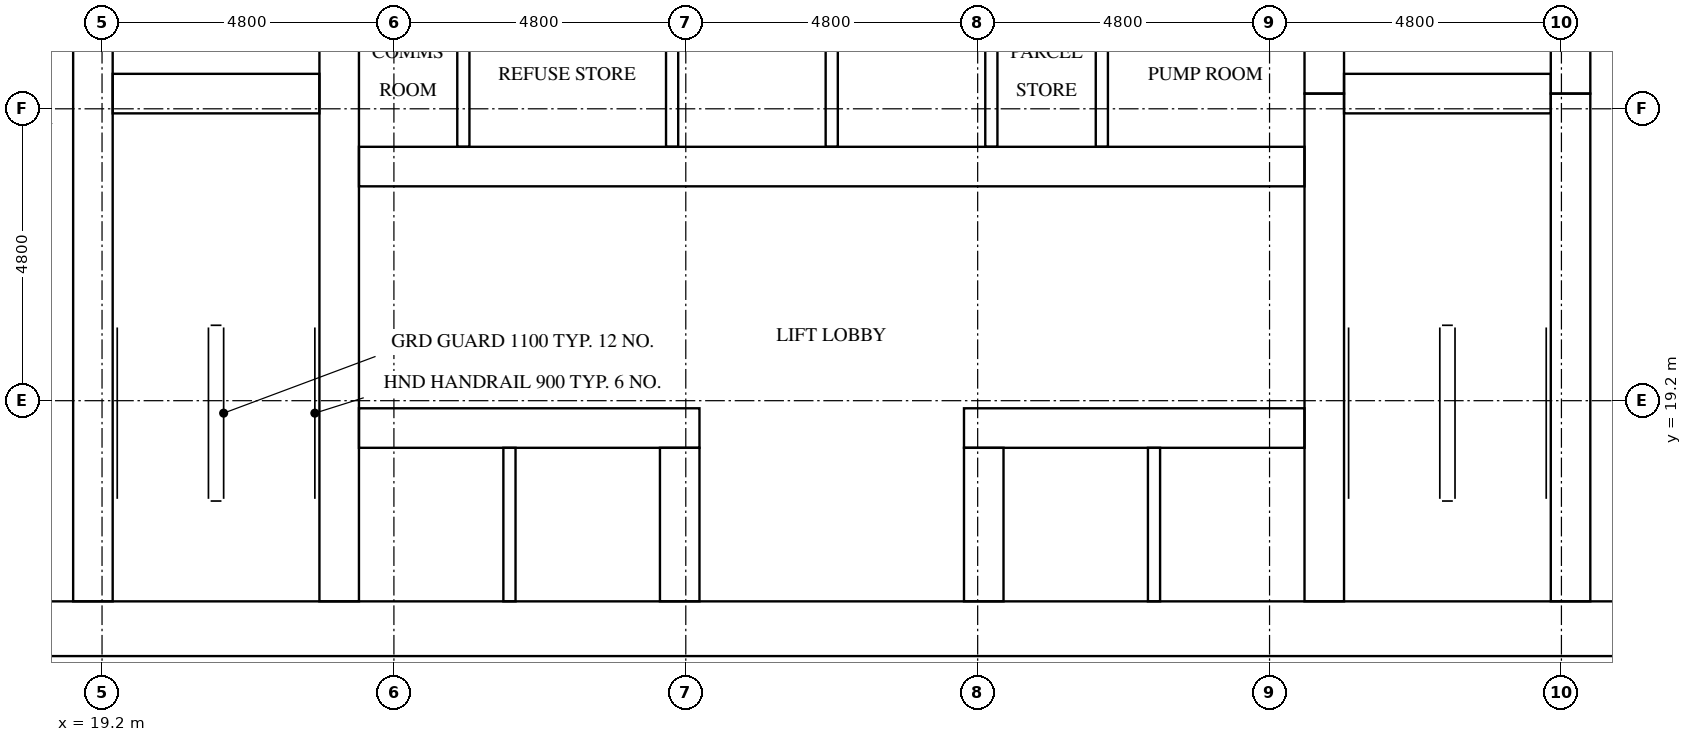
"""IFC4 building model, lengths in metres.
Left out: names, types, materials, properties, quantities, classifications, styles, units other than length and angle.
Written with IfcOpenShell. Run it as: python <this file> out.ifc"""

import sys

from ifc_helpers import new_model, si_unit, direction, frame, frame_2d, origin, place, context, subcontext, project, spatial, rectangle, extrude, element, fill, save


model = new_model("IFC4")
c1 = context("Model", 3, precision=1e-05, world=origin(), true_north=direction((0.0, 1.0)))
c2 = subcontext(c1, "Body", "Model", "MODEL_VIEW")
j1 = project(units=[si_unit("LENGTHUNIT", "METRE"), si_unit("PLANEANGLEUNIT", "RADIAN")], contexts=[c1])
p1 = place(None, origin())
s1 = spatial("IfcSite", under=j1, at=p1, CompositionType="ELEMENT")
p2 = place(p1, origin())
s2 = spatial("IfcBuilding", under=s1, at=p2, CompositionType="ELEMENT")
p3 = place(p2, frame((0.0, 0.0, 110.2)))
s3 = spatial("IfcBuildingStorey", under=s2, at=p3, CompositionType="ELEMENT", Elevation=110.2)
p4 = place(p3, frame((15.0, 15.45, 0.0), z_axis=(0.0, 0.0, 1.0), x_axis=(1.0, 0.0, 0.0)))
e1 = element("IfcWall", 1, at=p4, inside=s3, PredefinedType="SHEAR", context=c2, shape_type="SweptSolid", body=[
    extrude(rectangle(XDim=32.4, YDim=0.9, at=frame_2d((16.2, 0.0))), origin(), (0.0, 0.0, 1.0), 3.1),
])
p5 = place(p4, frame((15.3, 0.0, 0.0)))
e2 = element("IfcOpeningElement", 2, at=p5, cuts=e1, PredefinedType="OPENING", context=c2, shape_type="SweptSolid", body=[
    extrude(rectangle(XDim=1.8, YDim=2.1, at=frame_2d((0.9, 1.05))), frame((0.0, 0.46, 0.0), z_axis=(0.0, -1.0, 0.0), x_axis=(1.0, 0.0, 0.0)), (0.0, 0.0, 1.0), 0.92),
])
p6 = place(p3, frame((19.05, 15.9, 0.0), z_axis=(0.0, 0.0, 1.0), x_axis=(0.0, 1.0, 0.0)))
e3 = element("IfcWall", 3, at=p6, inside=s3, PredefinedType="SHEAR", context=c2, shape_type="SweptSolid", body=[
    extrude(rectangle(XDim=15.025, YDim=0.65, at=frame_2d((7.513, 0.0))), origin(), (0.0, 0.0, 1.0), 3.1),
])
p7 = place(p6, frame((9.55, 0.0, 0.0)))
e4 = element("IfcOpeningElement", 4, at=p7, cuts=e3, PredefinedType="OPENING", context=c2, shape_type="SweptSolid", body=[
    extrude(rectangle(XDim=1.1, YDim=2.1, at=frame_2d((0.55, 1.05))), frame((0.0, 0.335, 0.0), z_axis=(0.0, -1.0, 0.0), x_axis=(1.0, 0.0, 0.0)), (0.0, 0.0, 1.0), 0.67),
])
p8 = place(p6, frame((13.05, 0.0, 0.0)))
e5 = element("IfcOpeningElement", 5, at=p8, cuts=e3, PredefinedType="OPENING", context=c2, shape_type="SweptSolid", body=[
    extrude(rectangle(XDim=1.1, YDim=2.1, at=frame_2d((0.55, 1.05))), frame((0.0, 0.335, 0.0), z_axis=(0.0, -1.0, 0.0), x_axis=(1.0, 0.0, 0.0)), (0.0, 0.0, 1.0), 0.67),
])
p9 = place(p6, frame((0.3, 0.0, 0.0)))
e6 = element("IfcOpeningElement", 6, at=p9, cuts=e3, PredefinedType="OPENING", context=c2, shape_type="SweptSolid", body=[
    extrude(rectangle(XDim=1.2, YDim=2.1, at=frame_2d((0.6, 1.05))), frame((0.0, 0.335, 0.0), z_axis=(0.0, -1.0, 0.0), x_axis=(1.0, 0.0, 0.0)), (0.0, 0.0, 1.0), 0.67),
])
p10 = place(p3, frame((23.1, 15.9, 0.0), z_axis=(0.0, 0.0, 1.0), x_axis=(0.0, 1.0, 0.0)))
e7 = element("IfcWall", 7, at=p10, inside=s3, PredefinedType="SHEAR", context=c2, shape_type="SweptSolid", body=[
    extrude(rectangle(XDim=21.0, YDim=0.65, at=frame_2d((10.5, 0.0))), origin(), (0.0, 0.0, 1.0), 3.1),
])
p11 = place(p3, frame((39.3, 15.9, 0.0), z_axis=(0.0, 0.0, 1.0), x_axis=(0.0, 1.0, 0.0)))
e8 = element("IfcWall", 8, at=p11, inside=s3, PredefinedType="SHEAR", context=c2, shape_type="SweptSolid", body=[
    extrude(rectangle(XDim=8.35, YDim=0.65, at=frame_2d((4.175, 0.0))), origin(), (0.0, 0.0, 1.0), 3.1),
])
p12 = place(p3, frame((39.3, 24.25, 0.0), z_axis=(0.0, 0.0, 1.0), x_axis=(0.0, 1.0, 0.0)))
e9 = element("IfcWall", 9, at=p12, inside=s3, PredefinedType="SHEAR", context=c2, shape_type="SweptSolid", body=[
    extrude(rectangle(XDim=3.5, YDim=0.65, at=frame_2d((1.75, 0.0))), origin(), (0.0, 0.0, 1.0), 3.1),
])
p13 = place(p3, frame((43.35, 15.9, 0.0), z_axis=(0.0, 0.0, 1.0), x_axis=(0.0, 1.0, 0.0)))
e10 = element("IfcWall", 10, at=p13, inside=s3, PredefinedType="SHEAR", context=c2, shape_type="SweptSolid", body=[
    extrude(rectangle(XDim=8.35, YDim=0.65, at=frame_2d((4.175, 0.0))), origin(), (0.0, 0.0, 1.0), 3.1),
])
p14 = place(p13, frame((0.3, 0.0, 0.0)))
e11 = element("IfcOpeningElement", 11, at=p14, cuts=e10, PredefinedType="OPENING", context=c2, shape_type="SweptSolid", body=[
    extrude(rectangle(XDim=1.2, YDim=2.1, at=frame_2d((0.6, 1.05))), frame((0.0, 0.335, 0.0), z_axis=(0.0, -1.0, 0.0), x_axis=(1.0, 0.0, 0.0)), (0.0, 0.0, 1.0), 0.67),
])
p15 = place(p3, frame((43.35, 24.25, 0.0), z_axis=(0.0, 0.0, 1.0), x_axis=(0.0, 1.0, 0.0)))
e12 = element("IfcWall", 12, at=p15, inside=s3, PredefinedType="SHEAR", context=c2, shape_type="SweptSolid", body=[
    extrude(rectangle(XDim=3.5, YDim=0.65, at=frame_2d((1.75, 0.0))), origin(), (0.0, 0.0, 1.0), 3.1),
])
p16 = place(p15, frame((1.2, 0.0, 0.0)))
e13 = element("IfcOpeningElement", 13, at=p16, cuts=e12, PredefinedType="OPENING", context=c2, shape_type="SweptSolid", body=[
    extrude(rectangle(XDim=1.1, YDim=2.1, at=frame_2d((0.55, 1.05))), frame((0.0, 0.335, 0.0), z_axis=(0.0, -1.0, 0.0), x_axis=(1.0, 0.0, 0.0)), (0.0, 0.0, 1.0), 0.67),
])
for number, where, z_axis, x_axis in (
    (14, (19.375, 24.25, 0.0), (0.0, 0.0, 1.0), (1.0, 0.0, 0.0)),
    (15, (39.625, 24.25, 0.0), (0.0, 0.0, 1.0), (1.0, 0.0, 0.0)),
):
    element("IfcWall", number, at=place(p3, frame(where, z_axis=z_axis, x_axis=x_axis)), inside=s3, PredefinedType="SHEAR", context=c2, shape_type="SweptSolid", body=[
        extrude(rectangle(XDim=3.4, YDim=0.65, at=frame_2d((1.7, 0.0))), origin(), (0.0, 0.0, 1.0), 3.1),
    ])
p17 = place(p3, frame((23.425, 18.75, 0.0), z_axis=(0.0, 0.0, 1.0), x_axis=(1.0, 0.0, 0.0)))
e16 = element("IfcWall", 16, at=p17, inside=s3, PredefinedType="SHEAR", context=c2, shape_type="SweptSolid", body=[
    extrude(rectangle(XDim=5.6, YDim=0.65, at=frame_2d((2.8, 0.0))), origin(), (0.0, 0.0, 1.0), 3.1),
])
p18 = place(p17, frame((0.637, 0.0, 0.0)))
e17 = element("IfcOpeningElement", 17, at=p18, cuts=e16, PredefinedType="OPENING", context=c2, shape_type="SweptSolid", body=[
    extrude(rectangle(XDim=1.1, YDim=2.1, at=frame_2d((0.55, 1.05))), frame((0.0, 0.335, 0.0), z_axis=(0.0, -1.0, 0.0), x_axis=(1.0, 0.0, 0.0)), (0.0, 0.0, 1.0), 0.67),
])
p19 = place(p17, frame((3.212, 0.0, 0.0)))
e18 = element("IfcOpeningElement", 18, at=p19, cuts=e16, PredefinedType="OPENING", context=c2, shape_type="SweptSolid", body=[
    extrude(rectangle(XDim=1.1, YDim=2.1, at=frame_2d((0.55, 1.05))), frame((0.0, 0.335, 0.0), z_axis=(0.0, -1.0, 0.0), x_axis=(1.0, 0.0, 0.0)), (0.0, 0.0, 1.0), 0.67),
])
p20 = place(p3, frame((33.375, 18.75, 0.0), z_axis=(0.0, 0.0, 1.0), x_axis=(1.0, 0.0, 0.0)))
e19 = element("IfcWall", 19, at=p20, inside=s3, PredefinedType="SHEAR", context=c2, shape_type="SweptSolid", body=[
    extrude(rectangle(XDim=5.6, YDim=0.65, at=frame_2d((2.8, 0.0))), origin(), (0.0, 0.0, 1.0), 3.1),
])
p21 = place(p20, frame((1.288, 0.0, 0.0)))
e20 = element("IfcOpeningElement", 20, at=p21, cuts=e19, PredefinedType="OPENING", context=c2, shape_type="SweptSolid", body=[
    extrude(rectangle(XDim=1.1, YDim=2.1, at=frame_2d((0.55, 1.05))), frame((0.0, 0.335, 0.0), z_axis=(0.0, -1.0, 0.0), x_axis=(1.0, 0.0, 0.0)), (0.0, 0.0, 1.0), 0.67),
])
p22 = place(p20, frame((3.863, 0.0, 0.0)))
e21 = element("IfcOpeningElement", 21, at=p22, cuts=e19, PredefinedType="OPENING", context=c2, shape_type="SweptSolid", body=[
    extrude(rectangle(XDim=1.1, YDim=2.1, at=frame_2d((0.55, 1.05))), frame((0.0, 0.335, 0.0), z_axis=(0.0, -1.0, 0.0), x_axis=(1.0, 0.0, 0.0)), (0.0, 0.0, 1.0), 0.67),
])
p23 = place(p3, frame((23.425, 23.05, 0.0), z_axis=(0.0, 0.0, 1.0), x_axis=(1.0, 0.0, 0.0)))
e22 = element("IfcWall", 22, at=p23, inside=s3, PredefinedType="SHEAR", context=c2, shape_type="SweptSolid", body=[
    extrude(rectangle(XDim=15.55, YDim=0.65, at=frame_2d((7.775, 0.0))), origin(), (0.0, 0.0, 1.0), 3.1),
])
p24 = place(p23, frame((0.309, 0.0, 0.0)))
e23 = element("IfcOpeningElement", 23, at=p24, cuts=e22, PredefinedType="OPENING", context=c2, shape_type="SweptSolid", body=[
    extrude(rectangle(XDim=1.0, YDim=2.1, at=frame_2d((0.5, 1.05))), frame((0.0, 0.335, 0.0), z_axis=(0.0, -1.0, 0.0), x_axis=(1.0, 0.0, 0.0)), (0.0, 0.0, 1.0), 0.67),
])
p25 = place(p23, frame((2.934, 0.0, 0.0)))
e24 = element("IfcOpeningElement", 24, at=p25, cuts=e22, PredefinedType="OPENING", context=c2, shape_type="SweptSolid", body=[
    extrude(rectangle(XDim=1.0, YDim=2.1, at=frame_2d((0.5, 1.05))), frame((0.0, 0.335, 0.0), z_axis=(0.0, -1.0, 0.0), x_axis=(1.0, 0.0, 0.0)), (0.0, 0.0, 1.0), 0.67),
])
p26 = place(p23, frame((10.809, 0.0, 0.0)))
e25 = element("IfcOpeningElement", 25, at=p26, cuts=e22, PredefinedType="OPENING", context=c2, shape_type="SweptSolid", body=[
    extrude(rectangle(XDim=1.0, YDim=2.1, at=frame_2d((0.5, 1.05))), frame((0.0, 0.335, 0.0), z_axis=(0.0, -1.0, 0.0), x_axis=(1.0, 0.0, 0.0)), (0.0, 0.0, 1.0), 0.67),
])
p27 = place(p23, frame((13.434, 0.0, 0.0)))
e26 = element("IfcOpeningElement", 26, at=p27, cuts=e22, PredefinedType="OPENING", context=c2, shape_type="SweptSolid", body=[
    extrude(rectangle(XDim=1.0, YDim=2.1, at=frame_2d((0.5, 1.05))), frame((0.0, 0.335, 0.0), z_axis=(0.0, -1.0, 0.0), x_axis=(1.0, 0.0, 0.0)), (0.0, 0.0, 1.0), 0.67),
])
for number, where, z_axis, x_axis in (
    (27, (28.7, 15.9, 0.0), (0.0, 0.0, 1.0), (0.0, 1.0, 0.0)),
    (28, (33.7, 15.9, 0.0), (0.0, 0.0, 1.0), (0.0, 1.0, 0.0)),
):
    element("IfcWall", number, at=place(p3, frame(where, z_axis=z_axis, x_axis=x_axis)), inside=s3, PredefinedType="SHEAR", context=c2, shape_type="SweptSolid", body=[
        extrude(rectangle(XDim=2.525, YDim=0.65, at=frame_2d((1.263, 0.0))), origin(), (0.0, 0.0, 1.0), 3.1),
    ])
for number, where, z_axis, x_axis in (
    (29, (28.575, 23.375, 0.0), (0.0, 0.0, 1.0), (0.0, 1.0, 0.0)),
    (30, (31.2, 23.375, 0.0), (0.0, 0.0, 1.0), (0.0, 1.0, 0.0)),
    (31, (33.825, 23.375, 0.0), (0.0, 0.0, 1.0), (0.0, 1.0, 0.0)),
):
    element("IfcWall", number, at=place(p3, frame(where, z_axis=z_axis, x_axis=x_axis)), inside=s3, PredefinedType="SOLIDWALL", context=c2, shape_type="SweptSolid", body=[
        extrude(rectangle(XDim=2.45, YDim=0.2, at=frame_2d((1.225, 0.0))), origin(), (0.0, 0.0, 1.0), 3.1),
    ])
for number, where, z_axis, x_axis in (
    (32, (25.9, 15.9, 0.0), (0.0, 0.0, 1.0), (0.0, 1.0, 0.0)),
    (33, (36.5, 15.9, 0.0), (0.0, 0.0, 1.0), (0.0, 1.0, 0.0)),
):
    element("IfcWall", number, at=place(p3, frame(where, z_axis=z_axis, x_axis=x_axis)), inside=s3, PredefinedType="SOLIDWALL", context=c2, shape_type="SweptSolid", body=[
        extrude(rectangle(XDim=2.525, YDim=0.2, at=frame_2d((1.263, 0.0))), origin(), (0.0, 0.0, 1.0), 3.1),
    ])
for number, where, z_axis, x_axis in (
    (34, (25.142, 23.375, 0.0), (0.0, 0.0, 1.0), (0.0, 1.0, 0.0)),
    (35, (35.642, 23.375, 0.0), (0.0, 0.0, 1.0), (0.0, 1.0, 0.0)),
):
    element("IfcWall", number, at=place(p3, frame(where, z_axis=z_axis, x_axis=x_axis)), inside=s3, PredefinedType="PARTITIONING", context=c2, shape_type="SweptSolid", body=[
        extrude(rectangle(XDim=2.45, YDim=0.2, at=frame_2d((1.225, 0.0))), origin(), (0.0, 0.0, 1.0), 3.1),
    ])
p28 = place(p18, origin())
e36 = element("IfcDoor", 36, at=p28, inside=s3, OperationType="DOUBLE_DOOR_SLIDING", PredefinedType="DOOR", context=c2, shape_type="SweptSolid", body=[
    extrude(rectangle(XDim=1.1, YDim=2.1, at=frame_2d((0.55, 1.05))), frame((0.0, 0.025, 0.0), z_axis=(0.0, -1.0, 0.0), x_axis=(1.0, 0.0, 0.0)), (0.0, 0.0, 1.0), 0.05),
])
fill(e17, e36)
p29 = place(p19, origin())
e37 = element("IfcDoor", 37, at=p29, inside=s3, OperationType="DOUBLE_DOOR_SLIDING", PredefinedType="DOOR", context=c2, shape_type="SweptSolid", body=[
    extrude(rectangle(XDim=1.1, YDim=2.1, at=frame_2d((0.55, 1.05))), frame((0.0, 0.025, 0.0), z_axis=(0.0, -1.0, 0.0), x_axis=(1.0, 0.0, 0.0)), (0.0, 0.0, 1.0), 0.05),
])
fill(e18, e37)
p30 = place(p21, origin())
e38 = element("IfcDoor", 38, at=p30, inside=s3, OperationType="DOUBLE_DOOR_SLIDING", PredefinedType="DOOR", context=c2, shape_type="SweptSolid", body=[
    extrude(rectangle(XDim=1.1, YDim=2.1, at=frame_2d((0.55, 1.05))), frame((0.0, 0.025, 0.0), z_axis=(0.0, -1.0, 0.0), x_axis=(1.0, 0.0, 0.0)), (0.0, 0.0, 1.0), 0.05),
])
fill(e20, e38)
p31 = place(p22, origin())
e39 = element("IfcDoor", 39, at=p31, inside=s3, OperationType="DOUBLE_DOOR_SLIDING", PredefinedType="DOOR", context=c2, shape_type="SweptSolid", body=[
    extrude(rectangle(XDim=1.1, YDim=2.1, at=frame_2d((0.55, 1.05))), frame((0.0, 0.025, 0.0), z_axis=(0.0, -1.0, 0.0), x_axis=(1.0, 0.0, 0.0)), (0.0, 0.0, 1.0), 0.05),
])
fill(e21, e39)
p32 = place(p9, frame((1.2, 0.0, 0.0), z_axis=(0.0, 0.0, 1.0), x_axis=(-1.0, 0.0, 0.0)))
e40 = element("IfcDoor", 40, at=p32, inside=s3, OperationType="SINGLE_SWING_RIGHT", PredefinedType="DOOR", context=c2, shape_type="SweptSolid", body=[
    extrude(rectangle(XDim=1.2, YDim=2.1, at=frame_2d((0.6, 1.05))), frame((0.0, 0.025, 0.0), z_axis=(0.0, -1.0, 0.0), x_axis=(1.0, 0.0, 0.0)), (0.0, 0.0, 1.0), 0.05),
])
fill(e6, e40)
p33 = place(p14, origin())
e41 = element("IfcDoor", 41, at=p33, inside=s3, OperationType="SINGLE_SWING_LEFT", PredefinedType="DOOR", context=c2, shape_type="SweptSolid", body=[
    extrude(rectangle(XDim=1.2, YDim=2.1, at=frame_2d((0.6, 1.05))), frame((0.0, 0.025, 0.0), z_axis=(0.0, -1.0, 0.0), x_axis=(1.0, 0.0, 0.0)), (0.0, 0.0, 1.0), 0.05),
])
fill(e11, e41)
p34 = place(p5, frame((1.8, 0.0, 0.0), z_axis=(0.0, 0.0, 1.0), x_axis=(-1.0, 0.0, 0.0)))
e42 = element("IfcDoor", 42, at=p34, inside=s3, OperationType="DOUBLE_DOOR_SINGLE_SWING", PredefinedType="DOOR", context=c2, shape_type="SweptSolid", body=[
    extrude(rectangle(XDim=1.8, YDim=2.1, at=frame_2d((0.9, 1.05))), frame((0.0, 0.025, 0.0), z_axis=(0.0, -1.0, 0.0), x_axis=(1.0, 0.0, 0.0)), (0.0, 0.0, 1.0), 0.05),
])
fill(e2, e42)
p35 = place(p24, frame((1.0, 0.0, 0.0), z_axis=(0.0, 0.0, 1.0), x_axis=(-1.0, 0.0, 0.0)))
e43 = element("IfcDoor", 43, at=p35, inside=s3, OperationType="SINGLE_SWING_LEFT", PredefinedType="DOOR", context=c2, shape_type="SweptSolid", body=[
    extrude(rectangle(XDim=1.0, YDim=2.1, at=frame_2d((0.5, 1.05))), frame((0.0, 0.025, 0.0), z_axis=(0.0, -1.0, 0.0), x_axis=(1.0, 0.0, 0.0)), (0.0, 0.0, 1.0), 0.05),
])
fill(e23, e43)
p36 = place(p25, frame((1.0, 0.0, 0.0), z_axis=(0.0, 0.0, 1.0), x_axis=(-1.0, 0.0, 0.0)))
e44 = element("IfcDoor", 44, at=p36, inside=s3, OperationType="SINGLE_SWING_RIGHT", PredefinedType="DOOR", context=c2, shape_type="SweptSolid", body=[
    extrude(rectangle(XDim=1.0, YDim=2.1, at=frame_2d((0.5, 1.05))), frame((0.0, 0.025, 0.0), z_axis=(0.0, -1.0, 0.0), x_axis=(1.0, 0.0, 0.0)), (0.0, 0.0, 1.0), 0.05),
])
fill(e24, e44)
p37 = place(p26, frame((1.0, 0.0, 0.0), z_axis=(0.0, 0.0, 1.0), x_axis=(-1.0, 0.0, 0.0)))
e45 = element("IfcDoor", 45, at=p37, inside=s3, OperationType="SINGLE_SWING_LEFT", PredefinedType="DOOR", context=c2, shape_type="SweptSolid", body=[
    extrude(rectangle(XDim=1.0, YDim=2.1, at=frame_2d((0.5, 1.05))), frame((0.0, 0.025, 0.0), z_axis=(0.0, -1.0, 0.0), x_axis=(1.0, 0.0, 0.0)), (0.0, 0.0, 1.0), 0.05),
])
fill(e25, e45)
p38 = place(p27, frame((1.0, 0.0, 0.0), z_axis=(0.0, 0.0, 1.0), x_axis=(-1.0, 0.0, 0.0)))
e46 = element("IfcDoor", 46, at=p38, inside=s3, OperationType="SINGLE_SWING_RIGHT", PredefinedType="DOOR", context=c2, shape_type="SweptSolid", body=[
    extrude(rectangle(XDim=1.0, YDim=2.1, at=frame_2d((0.5, 1.05))), frame((0.0, 0.025, 0.0), z_axis=(0.0, -1.0, 0.0), x_axis=(1.0, 0.0, 0.0)), (0.0, 0.0, 1.0), 0.05),
])
fill(e26, e46)
save(model, sys.argv[1])
